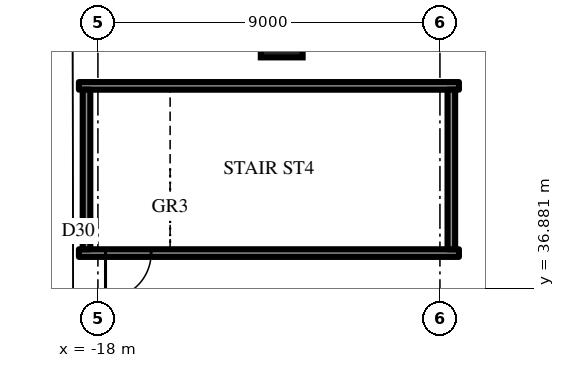
"""IFC4 building model, lengths in metres.
Left out: names, types, materials, properties, quantities, classifications, styles, units other than length and angle.
Written with IfcOpenShell. Run it as: python <this file> out.ifc"""

import sys

from ifc_helpers import new_model, si_unit, direction, frame, frame_2d, origin, origin_2d, place, context, subcontext, project, spatial, rectangle, extrude, element, fill, save


model = new_model("IFC4")
c1 = context("Model", 3, precision=1e-05, world=origin(), true_north=direction((0.0, 1.0)))
c2 = subcontext(c1, "Body", "Model", "MODEL_VIEW")
j1 = project(units=[si_unit("LENGTHUNIT", "METRE"), si_unit("PLANEANGLEUNIT", "RADIAN")], contexts=[c1])
p1 = place(None, origin())
s1 = spatial("IfcSite", under=j1, at=p1, CompositionType="ELEMENT")
p2 = place(p1, origin())
s2 = spatial("IfcBuilding", under=s1, at=p2, CompositionType="ELEMENT")
p3 = place(p2, frame((0.0, 0.0, 18.5)))
s3 = spatial("IfcBuildingStorey", under=s2, at=p3, CompositionType="ELEMENT", Elevation=18.5)
p4 = place(p3, frame((-18.5, 37.8, 0.0), z_axis=(0.0, 0.0, 1.0), x_axis=(1.0, 0.0, 0.0)))
e1 = element("IfcWall", 1, at=p4, inside=s3, PredefinedType="SHEAR", context=c2, shape_type="SweptSolid", body=[
    extrude(rectangle(XDim=10.0, YDim=0.2, at=frame_2d((5.0, 0.0))), origin(), (0.0, 0.0, 1.0), 5.0),
])
p5 = place(p4, frame((0.7, 0.0, 0.0)))
e2 = element("IfcOpeningElement", 2, at=p5, cuts=e1, PredefinedType="OPENING", context=c2, shape_type="SweptSolid", body=[
    extrude(rectangle(XDim=1.2, YDim=2.2, at=frame_2d((0.6, 1.1))), frame((0.0, 0.11, 0.0), z_axis=(0.0, -1.0, 0.0), x_axis=(1.0, 0.0, 0.0)), (0.0, 0.0, 1.0), 0.22),
])
p6 = place(p3, frame((-8.5, 42.2, 0.0), z_axis=(0.0, 0.0, 1.0), x_axis=(-1.0, 0.0, 0.0)))
e3 = element("IfcWall", 3, at=p6, inside=s3, PredefinedType="SHEAR", context=c2, shape_type="SweptSolid", body=[
    extrude(rectangle(XDim=10.0, YDim=0.2, at=frame_2d((5.0, 0.0))), origin(), (0.0, 0.0, 1.0), 5.0),
])
for number, where, z_axis, x_axis in (
    (4, (-18.3, 42.1, 0.0), (0.0, 0.0, 1.0), (0.0, -1.0, 0.0)),
    (5, (-8.7, 37.9, 0.0), (0.0, 0.0, 1.0), (0.0, 1.0, 0.0)),
):
    element("IfcWall", number, at=place(p3, frame(where, z_axis=z_axis, x_axis=x_axis)), inside=s3, PredefinedType="SHEAR", context=c2, shape_type="SweptSolid", body=[
        extrude(rectangle(XDim=4.2, YDim=0.2, at=frame_2d((2.1, 0.0))), origin(), (0.0, 0.0, 1.0), 5.0),
    ])
p7 = place(p3, frame((-13.164, 43.5, 0.0), z_axis=(0.0, 0.0, 1.0), x_axis=(-1.0, 0.0, 0.0)))
e6 = element("IfcColumn", 6, at=p7, inside=s3, PredefinedType="COLUMN", context=c2, shape_type="SweptSolid", body=[
    extrude(rectangle(XDim=1.1, YDim=1.1, at=origin_2d()), origin(), (0.0, 0.0, 1.0), 5.0),
])
p8 = place(p5, frame((1.2, 0.0, 0.0), z_axis=(0.0, 0.0, 1.0), x_axis=(-1.0, 0.0, 0.0)))
e7 = element("IfcDoor", 7, at=p8, inside=s3, OperationType="SINGLE_SWING_LEFT", PredefinedType="DOOR", context=c2, shape_type="SweptSolid", body=[
    extrude(rectangle(XDim=1.2, YDim=2.2, at=frame_2d((0.6, 1.1))), frame((0.0, 0.025, 0.0), z_axis=(0.0, -1.0, 0.0), x_axis=(1.0, 0.0, 0.0)), (0.0, 0.0, 1.0), 0.05),
])
fill(e2, e7)
save(model, sys.argv[1])
